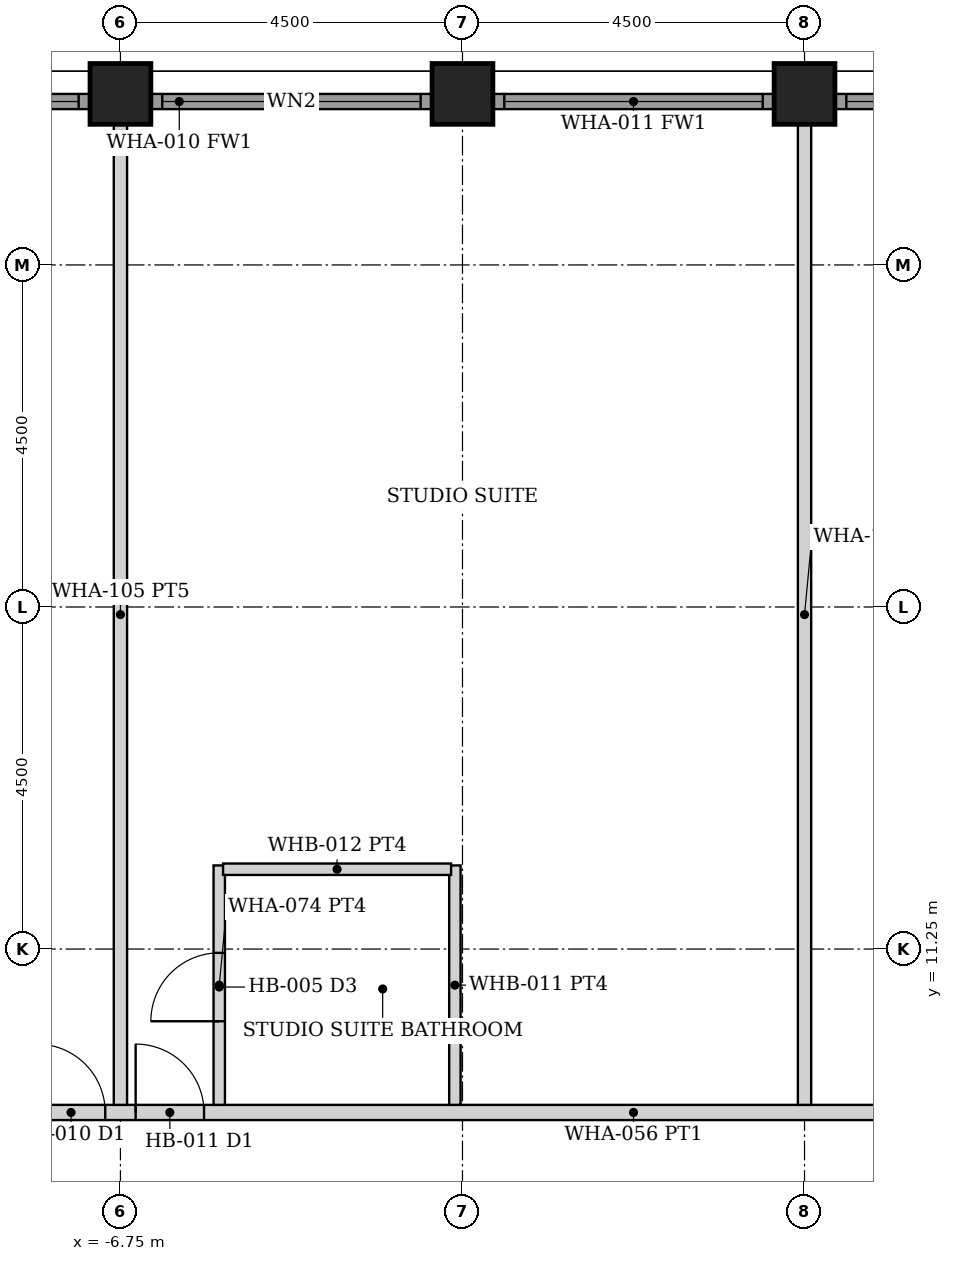
"""IFC4 building model, lengths in metres.
Left out: names, types, materials, properties, quantities, classifications, styles, units other than length and angle.
Written with IfcOpenShell. Run it as: python <this file> out.ifc"""

import sys

from ifc_helpers import new_model, si_unit, direction, frame, frame_2d, origin, origin_2d, place, context, subcontext, project, spatial, rectangle, hollow_rectangle, extrude, element, fill, save


model = new_model("IFC4")
c1 = context("Model", 3, precision=1e-05, world=origin(), true_north=direction((0.0, 1.0)))
c2 = subcontext(c1, "Body", "Model", "MODEL_VIEW")
j1 = project(units=[si_unit("LENGTHUNIT", "METRE"), si_unit("PLANEANGLEUNIT", "RADIAN")], contexts=[c1])
p1 = place(None, origin())
s1 = spatial("IfcSite", under=j1, at=p1, CompositionType="ELEMENT")
p2 = place(p1, origin())
s2 = spatial("IfcBuilding", under=s1, at=p2, CompositionType="ELEMENT")
p3 = place(p2, frame((0.0, 0.0, 129.2)))
s3 = spatial("IfcBuildingStorey", under=s2, at=p3, CompositionType="ELEMENT", Elevation=129.2)
for number, where, z_axis, x_axis in (
    (1, (-6.75, 22.5, 0.0), (0.0, 0.0, 1.0), (0.0, 1.0, 0.0)),
    (2, (-2.25, 22.5, 0.0), (0.0, 0.0, 1.0), (0.0, 1.0, 0.0)),
    (3, (2.25, 22.5, 0.0), (0.0, 0.0, 1.0), (0.0, 1.0, 0.0)),
):
    element("IfcColumn", number, at=place(p3, frame(where, z_axis=z_axis, x_axis=x_axis)), inside=s3, PredefinedType="COLUMN", context=c2, shape_type="SweptSolid", body=[
        extrude(hollow_rectangle(XDim=0.8, YDim=0.8, WallThickness=0.06, at=origin_2d()), origin(), (0.0, 0.0, 1.0), 3.6),
    ])
p4 = place(p3, frame((-10.845, 22.4, 0.0), z_axis=(0.0, 0.0, 1.0), x_axis=(1.0, 0.0, 0.0)))
e4 = element("IfcWall", 4, at=p4, inside=s3, PredefinedType="SOLIDWALL", context=c2, shape_type="SweptSolid", body=[
    extrude(rectangle(XDim=3.69, YDim=0.2, at=frame_2d((1.845, 0.0))), origin(), (0.0, 0.0, 1.0), 2.479),
])
p5 = place(p4, frame((0.145, 0.0, 0.3)))
e5 = element("IfcOpeningElement", 5, at=p5, cuts=e4, PredefinedType="OPENING", context=c2, shape_type="SweptSolid", body=[
    extrude(rectangle(XDim=3.4, YDim=2.029, at=frame_2d((1.7, 1.015))), frame((0.0, 0.11, 0.0), z_axis=(0.0, -1.0, 0.0), x_axis=(1.0, 0.0, 0.0)), (0.0, 0.0, 1.0), 0.22),
])
p6 = place(p3, frame((-6.345, 22.4, 0.0), z_axis=(0.0, 0.0, 1.0), x_axis=(1.0, 0.0, 0.0)))
e6 = element("IfcWall", 6, at=p6, inside=s3, PredefinedType="SOLIDWALL", context=c2, shape_type="SweptSolid", body=[
    extrude(rectangle(XDim=3.69, YDim=0.2, at=frame_2d((1.845, 0.0))), origin(), (0.0, 0.0, 1.0), 2.479),
])
p7 = place(p6, frame((0.145, 0.0, 0.3)))
e7 = element("IfcOpeningElement", 7, at=p7, cuts=e6, PredefinedType="OPENING", context=c2, shape_type="SweptSolid", body=[
    extrude(rectangle(XDim=3.4, YDim=2.029, at=frame_2d((1.7, 1.015))), frame((0.0, 0.11, 0.0), z_axis=(0.0, -1.0, 0.0), x_axis=(1.0, 0.0, 0.0)), (0.0, 0.0, 1.0), 0.22),
])
p8 = place(p3, frame((-1.845, 22.4, 0.0), z_axis=(0.0, 0.0, 1.0), x_axis=(1.0, 0.0, 0.0)))
e8 = element("IfcWall", 8, at=p8, inside=s3, PredefinedType="SOLIDWALL", context=c2, shape_type="SweptSolid", body=[
    extrude(rectangle(XDim=3.69, YDim=0.2, at=frame_2d((1.845, 0.0))), origin(), (0.0, 0.0, 1.0), 2.479),
])
p9 = place(p8, frame((0.145, 0.0, 0.3)))
e9 = element("IfcOpeningElement", 9, at=p9, cuts=e8, PredefinedType="OPENING", context=c2, shape_type="SweptSolid", body=[
    extrude(rectangle(XDim=3.4, YDim=2.029, at=frame_2d((1.7, 1.015))), frame((0.0, 0.11, 0.0), z_axis=(0.0, -1.0, 0.0), x_axis=(1.0, 0.0, 0.0)), (0.0, 0.0, 1.0), 0.22),
])
p10 = place(p3, frame((2.655, 22.4, 0.0), z_axis=(0.0, 0.0, 1.0), x_axis=(1.0, 0.0, 0.0)))
e10 = element("IfcWall", 10, at=p10, inside=s3, PredefinedType="SOLIDWALL", context=c2, shape_type="SweptSolid", body=[
    extrude(rectangle(XDim=3.69, YDim=0.2, at=frame_2d((1.845, 0.0))), origin(), (0.0, 0.0, 1.0), 2.479),
])
p11 = place(p10, frame((0.145, 0.0, 0.3)))
e11 = element("IfcOpeningElement", 11, at=p11, cuts=e10, PredefinedType="OPENING", context=c2, shape_type="SweptSolid", body=[
    extrude(rectangle(XDim=3.4, YDim=2.029, at=frame_2d((1.7, 1.015))), frame((0.0, 0.11, 0.0), z_axis=(0.0, -1.0, 0.0), x_axis=(1.0, 0.0, 0.0)), (0.0, 0.0, 1.0), 0.22),
])
p12 = place(p3, frame((-22.3, 9.1, 0.0), z_axis=(0.0, 0.0, 1.0), x_axis=(1.0, 0.0, 0.0)))
e12 = element("IfcWall", 12, at=p12, inside=s3, PredefinedType="PARTITIONING", context=c2, shape_type="SweptSolid", body=[
    extrude(rectangle(XDim=44.6, YDim=0.2, at=frame_2d((22.3, 0.0))), origin(), (0.0, 0.0, 1.0), 2.473),
])
p13 = place(p12, frame((6.75, 0.0, 0.0)))
e13 = element("IfcOpeningElement", 13, at=p13, cuts=e12, PredefinedType="OPENING", context=c2, shape_type="SweptSolid", body=[
    extrude(rectangle(XDim=0.9, YDim=2.1, at=frame_2d((0.45, 1.05))), frame((0.0, 0.11, 0.0), z_axis=(0.0, -1.0, 0.0), x_axis=(1.0, 0.0, 0.0)), (0.0, 0.0, 1.0), 0.22),
])
p14 = place(p12, frame((14.45, 0.0, 0.0)))
e14 = element("IfcOpeningElement", 14, at=p14, cuts=e12, PredefinedType="OPENING", context=c2, shape_type="SweptSolid", body=[
    extrude(rectangle(XDim=0.9, YDim=2.1, at=frame_2d((0.45, 1.05))), frame((0.0, 0.11, 0.0), z_axis=(0.0, -1.0, 0.0), x_axis=(1.0, 0.0, 0.0)), (0.0, 0.0, 1.0), 0.22),
])
p15 = place(p12, frame((15.75, 0.0, 0.0)))
e15 = element("IfcOpeningElement", 15, at=p15, cuts=e12, PredefinedType="OPENING", context=c2, shape_type="SweptSolid", body=[
    extrude(rectangle(XDim=0.9, YDim=2.1, at=frame_2d((0.45, 1.05))), frame((0.0, 0.11, 0.0), z_axis=(0.0, -1.0, 0.0), x_axis=(1.0, 0.0, 0.0)), (0.0, 0.0, 1.0), 0.22),
])
p16 = place(p12, frame((32.45, 0.0, 0.0)))
e16 = element("IfcOpeningElement", 16, at=p16, cuts=e12, PredefinedType="OPENING", context=c2, shape_type="SweptSolid", body=[
    extrude(rectangle(XDim=0.9, YDim=2.1, at=frame_2d((0.45, 1.05))), frame((0.0, 0.11, 0.0), z_axis=(0.0, -1.0, 0.0), x_axis=(1.0, 0.0, 0.0)), (0.0, 0.0, 1.0), 0.22),
])
p17 = place(p12, frame((33.75, 0.0, 0.0)))
e17 = element("IfcOpeningElement", 17, at=p17, cuts=e12, PredefinedType="OPENING", context=c2, shape_type="SweptSolid", body=[
    extrude(rectangle(XDim=0.9, YDim=2.1, at=frame_2d((0.45, 1.05))), frame((0.0, 0.11, 0.0), z_axis=(0.0, -1.0, 0.0), x_axis=(1.0, 0.0, 0.0)), (0.0, 0.0, 1.0), 0.22),
])
p18 = place(p12, frame((38.85, 0.0, 0.0)))
e18 = element("IfcOpeningElement", 18, at=p18, cuts=e12, PredefinedType="OPENING", context=c2, shape_type="SweptSolid", body=[
    extrude(rectangle(XDim=0.9, YDim=2.1, at=frame_2d((0.45, 1.05))), frame((0.0, 0.11, 0.0), z_axis=(0.0, -1.0, 0.0), x_axis=(1.0, 0.0, 0.0)), (0.0, 0.0, 1.0), 0.22),
])
p19 = place(p12, frame((4.85, 0.0, 0.0)))
e19 = element("IfcOpeningElement", 19, at=p19, cuts=e12, PredefinedType="OPENING", context=c2, shape_type="SweptSolid", body=[
    extrude(rectangle(XDim=0.9, YDim=2.1, at=frame_2d((0.45, 1.05))), frame((0.0, 0.11, 0.0), z_axis=(0.0, -1.0, 0.0), x_axis=(1.0, 0.0, 0.0)), (0.0, 0.0, 1.0), 0.22),
])
p20 = place(p3, frame((-5.45, 9.2, 0.0), z_axis=(0.0, 0.0, 1.0), x_axis=(0.0, 1.0, 0.0)))
e20 = element("IfcWall", 20, at=p20, inside=s3, PredefinedType="PARTITIONING", context=c2, shape_type="SweptSolid", body=[
    extrude(rectangle(XDim=3.15, YDim=0.15, at=frame_2d((1.575, 0.0))), origin(), (0.0, 0.0, 1.0), 2.473),
])
p21 = place(p20, frame((1.1, 0.0, 0.0)))
e21 = element("IfcOpeningElement", 21, at=p21, cuts=e20, PredefinedType="OPENING", context=c2, shape_type="SweptSolid", body=[
    extrude(rectangle(XDim=0.9, YDim=2.1, at=frame_2d((0.45, 1.05))), frame((0.0, 0.085, 0.0), z_axis=(0.0, -1.0, 0.0), x_axis=(1.0, 0.0, 0.0)), (0.0, 0.0, 1.0), 0.17),
])
p22 = place(p3, frame((-2.35, 9.2, 0.0), z_axis=(0.0, 0.0, 1.0), x_axis=(0.0, 1.0, 0.0)))
e22 = element("IfcWall", 22, at=p22, inside=s3, PredefinedType="PARTITIONING", context=c2, shape_type="SweptSolid", body=[
    extrude(rectangle(XDim=3.15, YDim=0.15, at=frame_2d((1.575, 0.0))), origin(), (0.0, 0.0, 1.0), 2.473),
])
p23 = place(p3, frame((-5.4, 12.3, 0.0), z_axis=(0.0, 0.0, 1.0), x_axis=(1.0, 0.0, 0.0)))
e23 = element("IfcWall", 23, at=p23, inside=s3, PredefinedType="PARTITIONING", context=c2, shape_type="SweptSolid", body=[
    extrude(rectangle(XDim=3.0, YDim=0.15, at=frame_2d((1.5, 0.0))), origin(), (0.0, 0.0, 1.0), 2.473),
])
for number, where, z_axis, x_axis in (
    (24, (-6.75, 9.2, 0.0), (0.0, 0.0, 1.0), (0.0, 1.0, 0.0)),
    (25, (2.25, 9.2, 0.0), (0.0, 0.0, 1.0), (0.0, 1.0, 0.0)),
):
    element("IfcWall", number, at=place(p3, frame(where, z_axis=z_axis, x_axis=x_axis)), inside=s3, PredefinedType="PARTITIONING", context=c2, shape_type="SweptSolid", body=[
        extrude(rectangle(XDim=12.9, YDim=0.175, at=frame_2d((6.45, 0.0))), origin(), (0.0, 0.0, 1.0), 2.473),
    ])
p24 = place(p5, origin())
e26 = element("IfcWindow", 26, at=p24, inside=s3, PartitioningType="SINGLE_PANEL", PredefinedType="WINDOW", context=c2, shape_type="SweptSolid", body=[
    extrude(rectangle(XDim=3.4, YDim=2.029, at=frame_2d((1.7, 1.015))), frame((0.0, 0.03, 0.0), z_axis=(0.0, -1.0, 0.0), x_axis=(1.0, 0.0, 0.0)), (0.0, 0.0, 1.0), 0.06),
])
fill(e5, e26)
p25 = place(p7, origin())
e27 = element("IfcWindow", 27, at=p25, inside=s3, PartitioningType="SINGLE_PANEL", PredefinedType="WINDOW", context=c2, shape_type="SweptSolid", body=[
    extrude(rectangle(XDim=3.4, YDim=2.029, at=frame_2d((1.7, 1.015))), frame((0.0, 0.03, 0.0), z_axis=(0.0, -1.0, 0.0), x_axis=(1.0, 0.0, 0.0)), (0.0, 0.0, 1.0), 0.06),
])
fill(e7, e27)
p26 = place(p9, origin())
e28 = element("IfcWindow", 28, at=p26, inside=s3, PartitioningType="SINGLE_PANEL", PredefinedType="WINDOW", context=c2, shape_type="SweptSolid", body=[
    extrude(rectangle(XDim=3.4, YDim=2.029, at=frame_2d((1.7, 1.015))), frame((0.0, 0.03, 0.0), z_axis=(0.0, -1.0, 0.0), x_axis=(1.0, 0.0, 0.0)), (0.0, 0.0, 1.0), 0.06),
])
fill(e9, e28)
p27 = place(p11, origin())
e29 = element("IfcWindow", 29, at=p27, inside=s3, PartitioningType="SINGLE_PANEL", PredefinedType="WINDOW", context=c2, shape_type="SweptSolid", body=[
    extrude(rectangle(XDim=3.4, YDim=2.029, at=frame_2d((1.7, 1.015))), frame((0.0, 0.03, 0.0), z_axis=(0.0, -1.0, 0.0), x_axis=(1.0, 0.0, 0.0)), (0.0, 0.0, 1.0), 0.06),
])
fill(e11, e29)
p28 = place(p14, origin())
e30 = element("IfcDoor", 30, at=p28, inside=s3, OperationType="SINGLE_SWING_LEFT", PredefinedType="DOOR", context=c2, shape_type="SweptSolid", body=[
    extrude(rectangle(XDim=0.9, YDim=2.1, at=frame_2d((0.45, 1.05))), frame((0.0, 0.025, 0.0), z_axis=(0.0, -1.0, 0.0), x_axis=(1.0, 0.0, 0.0)), (0.0, 0.0, 1.0), 0.05),
])
fill(e14, e30)
p29 = place(p15, origin())
e31 = element("IfcDoor", 31, at=p29, inside=s3, OperationType="SINGLE_SWING_LEFT", PredefinedType="DOOR", context=c2, shape_type="SweptSolid", body=[
    extrude(rectangle(XDim=0.9, YDim=2.1, at=frame_2d((0.45, 1.05))), frame((0.0, 0.025, 0.0), z_axis=(0.0, -1.0, 0.0), x_axis=(1.0, 0.0, 0.0)), (0.0, 0.0, 1.0), 0.05),
])
fill(e15, e31)
p30 = place(p21, origin())
e32 = element("IfcDoor", 32, at=p30, inside=s3, OperationType="SINGLE_SWING_LEFT", PredefinedType="DOOR", context=c2, shape_type="SweptSolid", body=[
    extrude(rectangle(XDim=0.9, YDim=2.1, at=frame_2d((0.45, 1.05))), frame((0.0, 0.025, 0.0), z_axis=(0.0, -1.0, 0.0), x_axis=(1.0, 0.0, 0.0)), (0.0, 0.0, 1.0), 0.05),
])
fill(e21, e32)
save(model, sys.argv[1])
